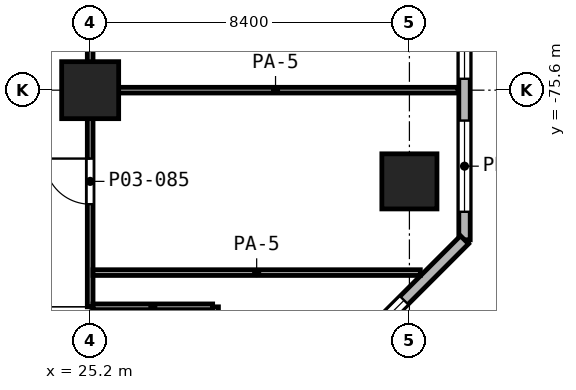
"""IFC4 building model, lengths in metres.
Left out: names, types, materials, properties, quantities, classifications, styles, units other than length and angle.
Written with IfcOpenShell. Run it as: python <this file> out.ifc"""

import sys

from ifc_helpers import new_model, si_unit, direction, frame, frame_2d, origin, origin_2d, place, context, subcontext, project, spatial, rectangle, extrude, element, fill, save


model = new_model("IFC4")
c1 = context("Model", 3, precision=1e-05, world=origin(), true_north=direction((0.0, 1.0)))
c2 = subcontext(c1, "Body", "Model", "MODEL_VIEW")
j1 = project(units=[si_unit("LENGTHUNIT", "METRE"), si_unit("PLANEANGLEUNIT", "RADIAN")], contexts=[c1])
p1 = place(None, origin())
s1 = spatial("IfcSite", under=j1, at=p1, CompositionType="ELEMENT")
p2 = place(p1, origin())
s2 = spatial("IfcBuilding", under=s1, at=p2, CompositionType="ELEMENT")
p3 = place(p2, frame((0.0, 0.0, 12.6)))
s3 = spatial("IfcBuildingStorey", under=s2, at=p3, CompositionType="ELEMENT", Elevation=12.6)
p4 = place(p3, frame((25.2, -75.6, 0.0), z_axis=(0.0, 0.0, 1.0), x_axis=(1.0, 0.0, 0.0)))
e1 = element("IfcColumn", 1, at=p4, inside=s3, PredefinedType="COLUMN", context=c2, shape_type="SweptSolid", body=[
    extrude(rectangle(XDim=1.5, YDim=1.5, at=origin_2d()), origin(), (0.0, 0.0, 1.0), 5.6),
])
p5 = place(p3, frame((33.6, -78.0, 0.0), z_axis=(0.0, 0.0, 1.0), x_axis=(1.0, 0.0, 0.0)))
e2 = element("IfcColumn", 2, at=p5, inside=s3, PredefinedType="COLUMN", context=c2, shape_type="SweptSolid", body=[
    extrude(rectangle(XDim=1.45, YDim=1.45, at=origin_2d()), origin(), (0.0, 0.0, 1.0), 5.6),
])
p6 = place(p3, frame((35.05, -79.538, 0.0), z_axis=(0.0, 0.0, 1.0), x_axis=(0.0, 1.0, 0.0)))
e3 = element("IfcWall", 3, at=p6, inside=s3, PredefinedType="SOLIDWALL", context=c2, shape_type="SweptSolid", body=[
    extrude(rectangle(XDim=38.4, YDim=0.3, at=frame_2d((19.2, 0.0))), origin(), (0.0, 0.0, 1.0), 5.25),
])
p7 = place(p6, frame((0.738, 0.0, 0.9)))
e4 = element("IfcOpeningElement", 4, at=p7, cuts=e3, PredefinedType="OPENING", context=c2, shape_type="SweptSolid", body=[
    extrude(rectangle(XDim=2.4, YDim=3.0, at=frame_2d((1.2, 1.5))), frame((0.0, 0.16, 0.0), z_axis=(0.0, -1.0, 0.0), x_axis=(1.0, 0.0, 0.0)), (0.0, 0.0, 1.0), 0.32),
])
p8 = place(p6, frame((4.238, 0.0, 0.9)))
e5 = element("IfcOpeningElement", 5, at=p8, cuts=e3, PredefinedType="OPENING", context=c2, shape_type="SweptSolid", body=[
    extrude(rectangle(XDim=3.6, YDim=3.0, at=frame_2d((1.8, 1.5))), frame((0.0, 0.16, 0.0), z_axis=(0.0, -1.0, 0.0), x_axis=(1.0, 0.0, 0.0)), (0.0, 0.0, 1.0), 0.32),
])
p9 = place(p6, frame((8.438, 0.0, 0.9)))
e6 = element("IfcOpeningElement", 6, at=p9, cuts=e3, PredefinedType="OPENING", context=c2, shape_type="SweptSolid", body=[
    extrude(rectangle(XDim=3.6, YDim=3.0, at=frame_2d((1.8, 1.5))), frame((0.0, 0.16, 0.0), z_axis=(0.0, -1.0, 0.0), x_axis=(1.0, 0.0, 0.0)), (0.0, 0.0, 1.0), 0.32),
])
p10 = place(p6, frame((12.638, 0.0, 0.9)))
e7 = element("IfcOpeningElement", 7, at=p10, cuts=e3, PredefinedType="OPENING", context=c2, shape_type="SweptSolid", body=[
    extrude(rectangle(XDim=3.6, YDim=3.0, at=frame_2d((1.8, 1.5))), frame((0.0, 0.16, 0.0), z_axis=(0.0, -1.0, 0.0), x_axis=(1.0, 0.0, 0.0)), (0.0, 0.0, 1.0), 0.32),
])
p11 = place(p6, frame((17.663, 0.0, 0.9)))
e8 = element("IfcOpeningElement", 8, at=p11, cuts=e3, PredefinedType="OPENING", context=c2, shape_type="SweptSolid", body=[
    extrude(rectangle(XDim=2.4, YDim=3.0, at=frame_2d((1.2, 1.5))), frame((0.0, 0.16, 0.0), z_axis=(0.0, -1.0, 0.0), x_axis=(1.0, 0.0, 0.0)), (0.0, 0.0, 1.0), 0.32),
])
p12 = place(p6, frame((21.563, 0.0, 0.9)))
e9 = element("IfcOpeningElement", 9, at=p12, cuts=e3, PredefinedType="OPENING", context=c2, shape_type="SweptSolid", body=[
    extrude(rectangle(XDim=2.4, YDim=3.0, at=frame_2d((1.2, 1.5))), frame((0.0, 0.16, 0.0), z_axis=(0.0, -1.0, 0.0), x_axis=(1.0, 0.0, 0.0)), (0.0, 0.0, 1.0), 0.32),
])
p13 = place(p6, frame((25.238, 0.0, 0.9)))
e10 = element("IfcOpeningElement", 10, at=p13, cuts=e3, PredefinedType="OPENING", context=c2, shape_type="SweptSolid", body=[
    extrude(rectangle(XDim=3.6, YDim=3.0, at=frame_2d((1.8, 1.5))), frame((0.0, 0.16, 0.0), z_axis=(0.0, -1.0, 0.0), x_axis=(1.0, 0.0, 0.0)), (0.0, 0.0, 1.0), 0.32),
])
p14 = place(p6, frame((29.438, 0.0, 0.9)))
e11 = element("IfcOpeningElement", 11, at=p14, cuts=e3, PredefinedType="OPENING", context=c2, shape_type="SweptSolid", body=[
    extrude(rectangle(XDim=3.6, YDim=3.0, at=frame_2d((1.8, 1.5))), frame((0.0, 0.16, 0.0), z_axis=(0.0, -1.0, 0.0), x_axis=(1.0, 0.0, 0.0)), (0.0, 0.0, 1.0), 0.32),
])
p15 = place(p6, frame((34.313, 0.0, 0.9)))
e12 = element("IfcOpeningElement", 12, at=p15, cuts=e3, PredefinedType="OPENING", context=c2, shape_type="SweptSolid", body=[
    extrude(rectangle(XDim=2.4, YDim=3.0, at=frame_2d((1.2, 1.5))), frame((0.0, 0.16, 0.0), z_axis=(0.0, -1.0, 0.0), x_axis=(1.0, 0.0, 0.0)), (0.0, 0.0, 1.0), 0.32),
])
p16 = place(p3, frame((29.138, -85.45, 0.0), z_axis=(0.0, 0.0, 1.0), x_axis=(0.707106781187, 0.707106781187, 0.0)))
e13 = element("IfcWall", 13, at=p16, inside=s3, PredefinedType="SOLIDWALL", context=c2, shape_type="SweptSolid", body=[
    extrude(rectangle(XDim=8.361, YDim=0.3, at=frame_2d((4.181, 0.0))), origin(), (0.0, 0.0, 1.0), 5.25),
])
p17 = place(p16, frame((0.259, 0.0, 0.9)))
e14 = element("IfcOpeningElement", 14, at=p17, cuts=e13, PredefinedType="OPENING", context=c2, shape_type="SweptSolid", body=[
    extrude(rectangle(XDim=3.6, YDim=3.0, at=frame_2d((1.8, 1.5))), frame((0.0, 0.16, 0.0), z_axis=(0.0, -1.0, 0.0), x_axis=(1.0, 0.0, 0.0)), (0.0, 0.0, 1.0), 0.32),
])
p18 = place(p16, frame((4.911, 0.0, 0.9)))
e15 = element("IfcOpeningElement", 15, at=p18, cuts=e13, PredefinedType="OPENING", context=c2, shape_type="SweptSolid", body=[
    extrude(rectangle(XDim=1.2, YDim=3.0, at=frame_2d((0.6, 1.5))), frame((0.0, 0.16, 0.0), z_axis=(0.0, -1.0, 0.0), x_axis=(1.0, 0.0, 0.0)), (0.0, 0.0, 1.0), 0.32),
])
p19 = place(p3, frame((25.275, -81.3, 0.0), z_axis=(0.0, 0.0, 1.0), x_axis=(1.0, 0.0, 0.0)))
e16 = element("IfcWall", 16, at=p19, inside=s3, PredefinedType="PARTITIONING", context=c2, shape_type="SweptSolid", body=[
    extrude(rectangle(XDim=3.148, YDim=0.15, at=frame_2d((1.574, 0.0))), origin(), (0.0, 0.0, 1.0), 5.25),
])
p20 = place(p3, frame((25.275, -80.4, 0.0), z_axis=(0.0, 0.0, 1.0), x_axis=(1.0, 0.0, 0.0)))
e17 = element("IfcWall", 17, at=p20, inside=s3, PredefinedType="PARTITIONING", context=c2, shape_type="SweptSolid", body=[
    extrude(rectangle(XDim=8.612, YDim=0.15, at=frame_2d((4.306, 0.0))), origin(), (0.0, 0.0, 1.0), 3.85),
])
p21 = place(p3, frame((25.275, -75.6, 0.0), z_axis=(0.0, 0.0, 1.0), x_axis=(1.0, 0.0, 0.0)))
e18 = element("IfcWall", 18, at=p21, inside=s3, PredefinedType="PARTITIONING", context=c2, shape_type="SweptSolid", body=[
    extrude(rectangle(XDim=9.605, YDim=0.15, at=frame_2d((4.802, 0.0))), origin(), (0.0, 0.0, 1.0), 3.85),
])
p22 = place(p3, frame((25.2, -81.3, 0.0), z_axis=(0.0, 0.0, 1.0), x_axis=(0.0, 1.0, 0.0)))
e19 = element("IfcWall", 19, at=p22, inside=s3, PredefinedType="PARTITIONING", context=c2, shape_type="SweptSolid", body=[
    extrude(rectangle(XDim=56.1, YDim=0.15, at=frame_2d((28.05, 0.0))), origin(), (0.0, 0.0, 1.0), 5.25),
])
p23 = place(p22, frame((48.5, 0.0, 0.0)))
e20 = element("IfcOpeningElement", 20, at=p23, cuts=e19, PredefinedType="OPENING", context=c2, shape_type="SweptSolid", body=[
    extrude(rectangle(XDim=1.2, YDim=2.1, at=frame_2d((0.6, 1.05))), frame((0.0, 0.085, 0.0), z_axis=(0.0, -1.0, 0.0), x_axis=(1.0, 0.0, 0.0)), (0.0, 0.0, 1.0), 0.17),
])
p24 = place(p22, frame((40.1, 0.0, 0.0)))
e21 = element("IfcOpeningElement", 21, at=p24, cuts=e19, PredefinedType="OPENING", context=c2, shape_type="SweptSolid", body=[
    extrude(rectangle(XDim=1.2, YDim=2.1, at=frame_2d((0.6, 1.05))), frame((0.0, 0.085, 0.0), z_axis=(0.0, -1.0, 0.0), x_axis=(1.0, 0.0, 0.0)), (0.0, 0.0, 1.0), 0.17),
])
p25 = place(p22, frame((36.75, 0.0, 0.0)))
e22 = element("IfcOpeningElement", 22, at=p25, cuts=e19, PredefinedType="OPENING", context=c2, shape_type="SweptSolid", body=[
    extrude(rectangle(XDim=1.2, YDim=2.1, at=frame_2d((0.6, 1.05))), frame((0.0, 0.085, 0.0), z_axis=(0.0, -1.0, 0.0), x_axis=(1.0, 0.0, 0.0)), (0.0, 0.0, 1.0), 0.17),
])
p26 = place(p22, frame((32.55, 0.0, 0.0)))
e23 = element("IfcOpeningElement", 23, at=p26, cuts=e19, PredefinedType="OPENING", context=c2, shape_type="SweptSolid", body=[
    extrude(rectangle(XDim=1.2, YDim=2.1, at=frame_2d((0.6, 1.05))), frame((0.0, 0.085, 0.0), z_axis=(0.0, -1.0, 0.0), x_axis=(1.0, 0.0, 0.0)), (0.0, 0.0, 1.0), 0.17),
])
p27 = place(p22, frame((28.05, 0.0, 0.0)))
e24 = element("IfcOpeningElement", 24, at=p27, cuts=e19, PredefinedType="OPENING", context=c2, shape_type="SweptSolid", body=[
    extrude(rectangle(XDim=1.2, YDim=2.1, at=frame_2d((0.6, 1.05))), frame((0.0, 0.085, 0.0), z_axis=(0.0, -1.0, 0.0), x_axis=(1.0, 0.0, 0.0)), (0.0, 0.0, 1.0), 0.17),
])
p28 = place(p22, frame((23.85, 0.0, 0.0)))
e25 = element("IfcOpeningElement", 25, at=p28, cuts=e19, PredefinedType="OPENING", context=c2, shape_type="SweptSolid", body=[
    extrude(rectangle(XDim=1.2, YDim=2.1, at=frame_2d((0.6, 1.05))), frame((0.0, 0.085, 0.0), z_axis=(0.0, -1.0, 0.0), x_axis=(1.0, 0.0, 0.0)), (0.0, 0.0, 1.0), 0.17),
])
p29 = place(p22, frame((20.1, 0.0, 0.0)))
e26 = element("IfcOpeningElement", 26, at=p29, cuts=e19, PredefinedType="OPENING", context=c2, shape_type="SweptSolid", body=[
    extrude(rectangle(XDim=1.2, YDim=2.1, at=frame_2d((0.6, 1.05))), frame((0.0, 0.085, 0.0), z_axis=(0.0, -1.0, 0.0), x_axis=(1.0, 0.0, 0.0)), (0.0, 0.0, 1.0), 0.17),
])
p30 = place(p22, frame((15.9, 0.0, 0.0)))
e27 = element("IfcOpeningElement", 27, at=p30, cuts=e19, PredefinedType="OPENING", context=c2, shape_type="SweptSolid", body=[
    extrude(rectangle(XDim=1.2, YDim=2.1, at=frame_2d((0.6, 1.05))), frame((0.0, 0.085, 0.0), z_axis=(0.0, -1.0, 0.0), x_axis=(1.0, 0.0, 0.0)), (0.0, 0.0, 1.0), 0.17),
])
p31 = place(p22, frame((11.4, 0.0, 0.0)))
e28 = element("IfcOpeningElement", 28, at=p31, cuts=e19, PredefinedType="OPENING", context=c2, shape_type="SweptSolid", body=[
    extrude(rectangle(XDim=1.2, YDim=2.1, at=frame_2d((0.6, 1.05))), frame((0.0, 0.085, 0.0), z_axis=(0.0, -1.0, 0.0), x_axis=(1.0, 0.0, 0.0)), (0.0, 0.0, 1.0), 0.17),
])
p32 = place(p22, frame((7.2, 0.0, 0.0)))
e29 = element("IfcOpeningElement", 29, at=p32, cuts=e19, PredefinedType="OPENING", context=c2, shape_type="SweptSolid", body=[
    extrude(rectangle(XDim=1.2, YDim=2.1, at=frame_2d((0.6, 1.05))), frame((0.0, 0.085, 0.0), z_axis=(0.0, -1.0, 0.0), x_axis=(1.0, 0.0, 0.0)), (0.0, 0.0, 1.0), 0.17),
])
p33 = place(p22, frame((2.7, 0.0, 0.0)))
e30 = element("IfcOpeningElement", 30, at=p33, cuts=e19, PredefinedType="OPENING", context=c2, shape_type="SweptSolid", body=[
    extrude(rectangle(XDim=1.2, YDim=2.1, at=frame_2d((0.6, 1.05))), frame((0.0, 0.085, 0.0), z_axis=(0.0, -1.0, 0.0), x_axis=(1.0, 0.0, 0.0)), (0.0, 0.0, 1.0), 0.17),
])
p34 = place(p3, frame((28.5, -84.998, 0.0), z_axis=(0.0, 0.0, 1.0), x_axis=(0.0, 1.0, 0.0)))
e31 = element("IfcWall", 31, at=p34, inside=s3, PredefinedType="PARTITIONING", context=c2, shape_type="SweptSolid", body=[
    extrude(rectangle(XDim=3.697, YDim=0.15, at=frame_2d((1.849, 0.0))), origin(), (0.0, 0.0, 1.0), 3.85),
])
p35 = place(p34, frame((1.749, 0.0, 0.0)))
e32 = element("IfcOpeningElement", 32, at=p35, cuts=e31, PredefinedType="OPENING", context=c2, shape_type="SweptSolid", body=[
    extrude(rectangle(XDim=1.0, YDim=2.1, at=frame_2d((0.5, 1.05))), frame((0.0, 0.085, 0.0), z_axis=(0.0, -1.0, 0.0), x_axis=(1.0, 0.0, 0.0)), (0.0, 0.0, 1.0), 0.17),
])
p36 = place(p7, origin())
e33 = element("IfcWindow", 33, at=p36, inside=s3, PartitioningType="SINGLE_PANEL", PredefinedType="WINDOW", context=c2, shape_type="SweptSolid", body=[
    extrude(rectangle(XDim=2.4, YDim=3.0, at=frame_2d((1.2, 1.5))), frame((0.0, 0.03, 0.0), z_axis=(0.0, -1.0, 0.0), x_axis=(1.0, 0.0, 0.0)), (0.0, 0.0, 1.0), 0.06),
])
fill(e4, e33)
p37 = place(p8, origin())
e34 = element("IfcWindow", 34, at=p37, inside=s3, PartitioningType="SINGLE_PANEL", PredefinedType="WINDOW", context=c2, shape_type="SweptSolid", body=[
    extrude(rectangle(XDim=3.6, YDim=3.0, at=frame_2d((1.8, 1.5))), frame((0.0, 0.03, 0.0), z_axis=(0.0, -1.0, 0.0), x_axis=(1.0, 0.0, 0.0)), (0.0, 0.0, 1.0), 0.06),
])
fill(e5, e34)
p38 = place(p18, origin())
e35 = element("IfcWindow", 35, at=p38, inside=s3, PartitioningType="SINGLE_PANEL", PredefinedType="WINDOW", context=c2, shape_type="SweptSolid", body=[
    extrude(rectangle(XDim=1.2, YDim=3.0, at=frame_2d((0.6, 1.5))), frame((0.0, 0.03, 0.0), z_axis=(0.0, -1.0, 0.0), x_axis=(1.0, 0.0, 0.0)), (0.0, 0.0, 1.0), 0.06),
])
fill(e15, e35)
p39 = place(p33, origin())
e36 = element("IfcDoor", 36, at=p39, inside=s3, OperationType="SINGLE_SWING_RIGHT", PredefinedType="DOOR", context=c2, shape_type="SweptSolid", body=[
    extrude(rectangle(XDim=1.2, YDim=2.1, at=frame_2d((0.6, 1.05))), frame((0.0, 0.025, 0.0), z_axis=(0.0, -1.0, 0.0), x_axis=(1.0, 0.0, 0.0)), (0.0, 0.0, 1.0), 0.05),
])
fill(e30, e36)
save(model, sys.argv[1])
